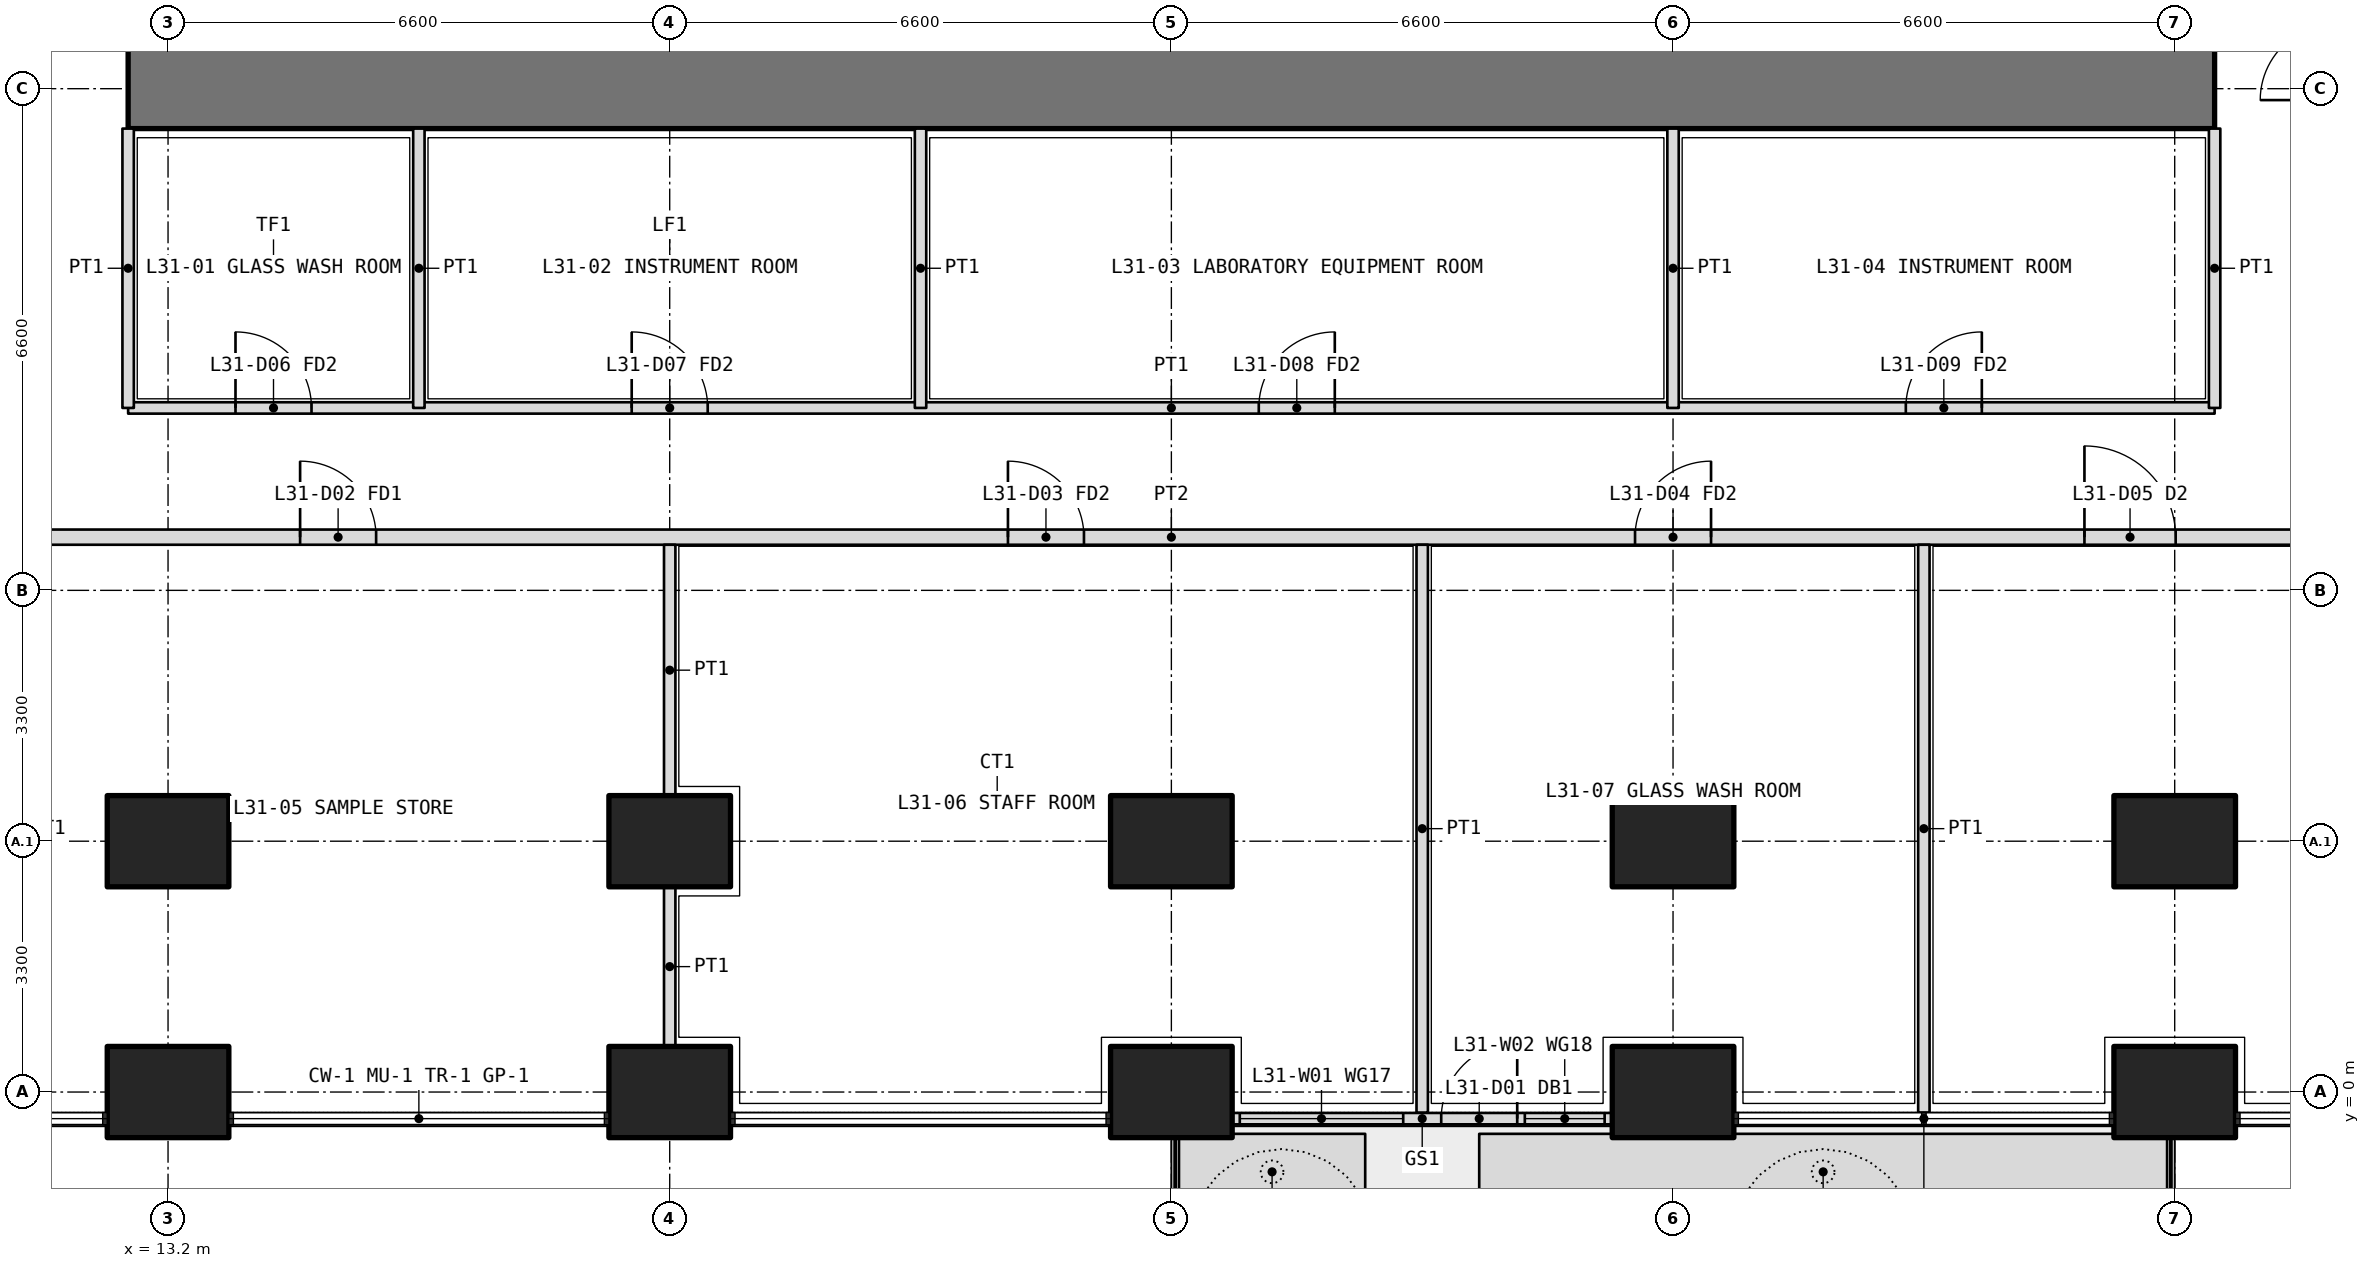
"""IFC4 building model, lengths in metres.
Left out: names, types, materials, properties, quantities, classifications, styles, units other than length and angle.
Written with IfcOpenShell. Run it as: python <this file> out.ifc"""

import sys

from ifc_helpers import new_model, si_unit, direction, frame, frame_2d, origin, origin_2d, place, context, subcontext, project, spatial, polyline, rectangle, outline, extrude, element, fill, save


model = new_model("IFC4")
c1 = context("Model", 3, precision=1e-05, world=origin(), true_north=direction((0.0, 1.0)))
c2 = subcontext(c1, "Body", "Model", "MODEL_VIEW")
j1 = project(units=[si_unit("LENGTHUNIT", "METRE"), si_unit("PLANEANGLEUNIT", "RADIAN")], contexts=[c1])
p1 = place(None, origin())
s1 = spatial("IfcSite", under=j1, at=p1, CompositionType="ELEMENT")
p2 = place(p1, origin())
s2 = spatial("IfcBuilding", under=s1, at=p2, CompositionType="ELEMENT")
p3 = place(p2, frame((0.0, 0.0, 136.8)))
s3 = spatial("IfcBuildingStorey", under=s2, at=p3, CompositionType="ELEMENT", Elevation=136.8)
for number, where, z_axis, x_axis in (
    (1, (13.2, 0.0, 0.0), (0.0, 0.0, 1.0), (1.0, 0.0, 0.0)),
    (2, (19.8, 0.0, 0.0), (0.0, 0.0, 1.0), (1.0, 0.0, 0.0)),
    (3, (26.4, 0.0, 0.0), (0.0, 0.0, 1.0), (1.0, 0.0, 0.0)),
    (4, (33.0, 0.0, 0.0), (0.0, 0.0, 1.0), (1.0, 0.0, 0.0)),
    (5, (39.6, 0.0, 0.0), (0.0, 0.0, 1.0), (1.0, 0.0, 0.0)),
    (6, (13.2, 3.3, 0.0), (0.0, 0.0, 1.0), (1.0, 0.0, 0.0)),
    (7, (19.8, 3.3, 0.0), (0.0, 0.0, 1.0), (1.0, 0.0, 0.0)),
    (8, (26.4, 3.3, 0.0), (0.0, 0.0, 1.0), (1.0, 0.0, 0.0)),
    (9, (33.0, 3.3, 0.0), (0.0, 0.0, 1.0), (1.0, 0.0, 0.0)),
    (10, (39.6, 3.3, 0.0), (0.0, 0.0, 1.0), (1.0, 0.0, 0.0)),
):
    element("IfcColumn", number, at=place(p3, frame(where, z_axis=z_axis, x_axis=x_axis)), inside=s3, PredefinedType="COLUMN", context=c2, shape_type="SweptSolid", body=[
        extrude(rectangle(XDim=1.6, YDim=1.2, at=origin_2d()), origin(), (0.0, 0.0, 1.0), 4.2),
    ])
p4 = place(p3, origin())
e11 = element("IfcWall", 11, at=p4, inside=s3, PredefinedType="USERDEFINED", context=c2, shape_type="SweptSolid", body=[
    extrude(outline(polyline([(26.5, -1.55), (28.95, -1.55), (28.95, -0.55), (26.5, -0.55), (26.5, -1.55)]), holes=[polyline([(26.65, -1.4), (28.8, -1.4), (28.8, -0.7), (26.65, -0.7), (26.65, -1.4)])]), origin(), (0.0, 0.0, 1.0), 1.05),
])
p5 = place(p3, origin())
e12 = element("IfcWall", 12, at=p5, inside=s3, PredefinedType="USERDEFINED", context=c2, shape_type="SweptSolid", body=[
    extrude(outline(polyline([(30.45, -1.55), (39.5, -1.55), (39.5, -0.55), (30.45, -0.55), (30.45, -1.55)]), holes=[polyline([(30.6, -1.4), (39.35, -1.4), (39.35, -0.7), (30.6, -0.7), (30.6, -1.4)])]), origin(), (0.0, 0.0, 1.0), 1.05),
])
p6 = place(p3, frame((27.2, -0.35, 0.0), z_axis=(0.0, 0.0, 1.0), x_axis=(1.0, 0.0, 0.0)))
e13 = element("IfcWall", 13, at=p6, inside=s3, PredefinedType="SOLIDWALL", context=c2, shape_type="SweptSolid", body=[
    extrude(rectangle(XDim=5.0, YDim=0.15, at=frame_2d((2.5, 0.0))), origin(), (0.0, 0.0, 1.0), 2.6),
])
p7 = place(p6, frame((2.75, 0.0, 0.0)))
e14 = element("IfcOpeningElement", 14, at=p7, cuts=e13, PredefinedType="OPENING", context=c2, shape_type="SweptSolid", body=[
    extrude(rectangle(XDim=1.0, YDim=2.4, at=frame_2d((0.5, 1.2))), frame((0.0, 0.085, 0.0), z_axis=(0.0, -1.0, 0.0), x_axis=(1.0, 0.0, 0.0)), (0.0, 0.0, 1.0), 0.17),
])
p8 = place(p6, frame((0.1, 0.0, 0.1)))
e15 = element("IfcOpeningElement", 15, at=p8, cuts=e13, PredefinedType="OPENING", context=c2, shape_type="SweptSolid", body=[
    extrude(rectangle(XDim=2.15, YDim=2.2, at=frame_2d((1.075, 1.1))), frame((0.0, 0.085, 0.0), z_axis=(0.0, -1.0, 0.0), x_axis=(1.0, 0.0, 0.0)), (0.0, 0.0, 1.0), 0.17),
])
p9 = place(p6, frame((3.85, 0.0, 0.1)))
e16 = element("IfcOpeningElement", 16, at=p9, cuts=e13, PredefinedType="OPENING", context=c2, shape_type="SweptSolid", body=[
    extrude(rectangle(XDim=1.05, YDim=2.2, at=frame_2d((0.525, 1.1))), frame((0.0, 0.085, 0.0), z_axis=(0.0, -1.0, 0.0), x_axis=(1.0, 0.0, 0.0)), (0.0, 0.0, 1.0), 0.17),
])
p10 = place(p3, frame((12.675, 13.2, 0.0), z_axis=(0.0, 0.0, 1.0), x_axis=(1.0, 0.0, 0.0)))
e17 = element("IfcWall", 17, at=p10, inside=s3, PredefinedType="SHEAR", context=c2, shape_type="SweptSolid", body=[
    extrude(rectangle(XDim=27.45, YDim=1.05, at=frame_2d((13.725, 0.0))), origin(), (0.0, 0.0, 1.0), 4.2),
])
p11 = place(p3, frame((12.675, 9.0, 0.0), z_axis=(0.0, 0.0, 1.0), x_axis=(1.0, 0.0, 0.0)))
e18 = element("IfcWall", 18, at=p11, inside=s3, PredefinedType="PARTITIONING", context=c2, shape_type="SweptSolid", body=[
    extrude(rectangle(XDim=27.45, YDim=0.15, at=frame_2d((13.725, 0.0))), origin(), (0.0, 0.0, 1.0), 2.85),
])
p12 = place(p11, frame((1.413, 0.0, 0.0)))
e19 = element("IfcOpeningElement", 19, at=p12, cuts=e18, PredefinedType="OPENING", context=c2, shape_type="SweptSolid", body=[
    extrude(rectangle(XDim=1.0, YDim=2.1, at=frame_2d((0.5, 1.05))), frame((0.0, 0.085, 0.0), z_axis=(0.0, -1.0, 0.0), x_axis=(1.0, 0.0, 0.0)), (0.0, 0.0, 1.0), 0.17),
])
p13 = place(p11, frame((6.625, 0.0, 0.0)))
e20 = element("IfcOpeningElement", 20, at=p13, cuts=e18, PredefinedType="OPENING", context=c2, shape_type="SweptSolid", body=[
    extrude(rectangle(XDim=1.0, YDim=2.1, at=frame_2d((0.5, 1.05))), frame((0.0, 0.085, 0.0), z_axis=(0.0, -1.0, 0.0), x_axis=(1.0, 0.0, 0.0)), (0.0, 0.0, 1.0), 0.17),
])
p14 = place(p11, frame((14.875, 0.0, 0.0)))
e21 = element("IfcOpeningElement", 21, at=p14, cuts=e18, PredefinedType="OPENING", context=c2, shape_type="SweptSolid", body=[
    extrude(rectangle(XDim=1.0, YDim=2.1, at=frame_2d((0.5, 1.05))), frame((0.0, 0.085, 0.0), z_axis=(0.0, -1.0, 0.0), x_axis=(1.0, 0.0, 0.0)), (0.0, 0.0, 1.0), 0.17),
])
p15 = place(p11, frame((23.387, 0.0, 0.0)))
e22 = element("IfcOpeningElement", 22, at=p15, cuts=e18, PredefinedType="OPENING", context=c2, shape_type="SweptSolid", body=[
    extrude(rectangle(XDim=1.0, YDim=2.1, at=frame_2d((0.5, 1.05))), frame((0.0, 0.085, 0.0), z_axis=(0.0, -1.0, 0.0), x_axis=(1.0, 0.0, 0.0)), (0.0, 0.0, 1.0), 0.17),
])
for number, where, z_axis, x_axis in (
    (23, (12.675, 12.675, 0.0), (0.0, 0.0, 1.0), (0.0, -1.0, 0.0)),
    (24, (40.125, 12.675, 0.0), (0.0, 0.0, 1.0), (0.0, -1.0, 0.0)),
):
    element("IfcWall", number, at=place(p3, frame(where, z_axis=z_axis, x_axis=x_axis)), inside=s3, PredefinedType="PARTITIONING", context=c2, shape_type="SweptSolid", body=[
        extrude(rectangle(XDim=3.675, YDim=0.15, at=frame_2d((1.837, 0.0))), origin(), (0.0, 0.0, 1.0), 2.85),
    ])
for number, where, z_axis, x_axis in (
    (25, (16.5, 12.675, 0.0), (0.0, 0.0, 1.0), (0.0, -1.0, 0.0)),
    (26, (23.1, 12.675, 0.0), (0.0, 0.0, 1.0), (0.0, -1.0, 0.0)),
):
    element("IfcWall", number, at=place(p3, frame(where, z_axis=z_axis, x_axis=x_axis)), inside=s3, PredefinedType="PARTITIONING", context=c2, shape_type="SweptSolid", body=[
        extrude(rectangle(XDim=3.675, YDim=0.15, at=frame_2d((1.837, 0.0))), origin(), (0.0, 0.0, 1.0), 3.9),
    ])
p16 = place(p3, frame((33.0, 12.675, 0.0), z_axis=(0.0, 0.0, 1.0), x_axis=(0.0, -1.0, 0.0)))
e27 = element("IfcWall", 27, at=p16, inside=s3, PredefinedType="PARTITIONING", context=c2, shape_type="SweptSolid", body=[
    extrude(rectangle(XDim=3.675, YDim=0.15, at=frame_2d((1.837, 0.0))), origin(), (0.0, 0.0, 1.0), 2.85),
])
p17 = place(p3, frame((10.975, 7.3, 0.0), z_axis=(0.0, 0.0, 1.0), x_axis=(1.0, 0.0, 0.0)))
e28 = element("IfcWall", 28, at=p17, inside=s3, PredefinedType="PARTITIONING", context=c2, shape_type="SweptSolid", body=[
    extrude(rectangle(XDim=30.85, YDim=0.2, at=frame_2d((15.425, 0.0))), origin(), (0.0, 0.0, 1.0), 2.85),
])
p18 = place(p17, frame((3.962, 0.0, 0.0)))
e29 = element("IfcOpeningElement", 29, at=p18, cuts=e28, PredefinedType="OPENING", context=c2, shape_type="SweptSolid", body=[
    extrude(rectangle(XDim=1.0, YDim=2.1, at=frame_2d((0.5, 1.05))), frame((0.0, 0.11, 0.0), z_axis=(0.0, -1.0, 0.0), x_axis=(1.0, 0.0, 0.0)), (0.0, 0.0, 1.0), 0.22),
])
p19 = place(p17, frame((13.275, 0.0, 0.0)))
e30 = element("IfcOpeningElement", 30, at=p19, cuts=e28, PredefinedType="OPENING", context=c2, shape_type="SweptSolid", body=[
    extrude(rectangle(XDim=1.0, YDim=2.1, at=frame_2d((0.5, 1.05))), frame((0.0, 0.11, 0.0), z_axis=(0.0, -1.0, 0.0), x_axis=(1.0, 0.0, 0.0)), (0.0, 0.0, 1.0), 0.22),
])
p20 = place(p17, frame((21.525, 0.0, 0.0)))
e31 = element("IfcOpeningElement", 31, at=p20, cuts=e28, PredefinedType="OPENING", context=c2, shape_type="SweptSolid", body=[
    extrude(rectangle(XDim=1.0, YDim=2.1, at=frame_2d((0.5, 1.05))), frame((0.0, 0.11, 0.0), z_axis=(0.0, -1.0, 0.0), x_axis=(1.0, 0.0, 0.0)), (0.0, 0.0, 1.0), 0.22),
])
p21 = place(p17, frame((27.438, 0.0, 0.0)))
e32 = element("IfcOpeningElement", 32, at=p21, cuts=e28, PredefinedType="OPENING", context=c2, shape_type="SweptSolid", body=[
    extrude(rectangle(XDim=1.2, YDim=2.1, at=frame_2d((0.6, 1.05))), frame((0.0, 0.11, 0.0), z_axis=(0.0, -1.0, 0.0), x_axis=(1.0, 0.0, 0.0)), (0.0, 0.0, 1.0), 0.22),
])
p22 = place(p3, frame((19.8, 0.6, 0.0), z_axis=(0.0, 0.0, 1.0), x_axis=(0.0, 1.0, 0.0)))
e33 = element("IfcWall", 33, at=p22, inside=s3, PredefinedType="PARTITIONING", context=c2, shape_type="SweptSolid", body=[
    extrude(rectangle(XDim=2.1, YDim=0.15, at=frame_2d((1.05, 0.0))), origin(), (0.0, 0.0, 1.0), 2.85),
])
p23 = place(p3, frame((19.8, 3.9, 0.0), z_axis=(0.0, 0.0, 1.0), x_axis=(0.0, 1.0, 0.0)))
e34 = element("IfcWall", 34, at=p23, inside=s3, PredefinedType="PARTITIONING", context=c2, shape_type="SweptSolid", body=[
    extrude(rectangle(XDim=3.3, YDim=0.15, at=frame_2d((1.65, 0.0))), origin(), (0.0, 0.0, 1.0), 2.85),
])
for number, where, z_axis, x_axis in (
    (35, (29.7, -0.27, 0.0), (0.0, 0.0, 1.0), (0.0, 1.0, 0.0)),
    (36, (36.3, -0.27, 0.0), (0.0, 0.0, 1.0), (0.0, 1.0, 0.0)),
):
    element("IfcWall", number, at=place(p3, frame(where, z_axis=z_axis, x_axis=x_axis)), inside=s3, PredefinedType="PARTITIONING", context=c2, shape_type="SweptSolid", body=[
        extrude(rectangle(XDim=7.47, YDim=0.15, at=frame_2d((3.735, 0.0))), origin(), (0.0, 0.0, 1.0), 2.6),
    ])
p24 = place(p7, origin())
e37 = element("IfcDoor", 37, at=p24, inside=s3, OperationType="SINGLE_SWING_RIGHT", PredefinedType="DOOR", context=c2, shape_type="SweptSolid", body=[
    extrude(rectangle(XDim=1.0, YDim=2.4, at=frame_2d((0.5, 1.2))), frame((0.0, 0.025, 0.0), z_axis=(0.0, -1.0, 0.0), x_axis=(1.0, 0.0, 0.0)), (0.0, 0.0, 1.0), 0.05),
])
fill(e14, e37)
p25 = place(p8, origin())
e38 = element("IfcWindow", 38, at=p25, inside=s3, PartitioningType="SINGLE_PANEL", PredefinedType="WINDOW", context=c2, shape_type="SweptSolid", body=[
    extrude(rectangle(XDim=2.15, YDim=2.2, at=frame_2d((1.075, 1.1))), frame((0.0, 0.03, 0.0), z_axis=(0.0, -1.0, 0.0), x_axis=(1.0, 0.0, 0.0)), (0.0, 0.0, 1.0), 0.06),
])
fill(e15, e38)
p26 = place(p9, origin())
e39 = element("IfcWindow", 39, at=p26, inside=s3, PartitioningType="SINGLE_PANEL", PredefinedType="WINDOW", context=c2, shape_type="SweptSolid", body=[
    extrude(rectangle(XDim=1.05, YDim=2.2, at=frame_2d((0.525, 1.1))), frame((0.0, 0.03, 0.0), z_axis=(0.0, -1.0, 0.0), x_axis=(1.0, 0.0, 0.0)), (0.0, 0.0, 1.0), 0.06),
])
fill(e16, e39)
p27 = place(p12, origin())
e40 = element("IfcDoor", 40, at=p27, inside=s3, OperationType="SINGLE_SWING_LEFT", PredefinedType="DOOR", context=c2, shape_type="SweptSolid", body=[
    extrude(rectangle(XDim=1.0, YDim=2.1, at=frame_2d((0.5, 1.05))), frame((0.0, 0.025, 0.0), z_axis=(0.0, -1.0, 0.0), x_axis=(1.0, 0.0, 0.0)), (0.0, 0.0, 1.0), 0.05),
])
fill(e19, e40)
p28 = place(p13, origin())
e41 = element("IfcDoor", 41, at=p28, inside=s3, OperationType="SINGLE_SWING_LEFT", PredefinedType="DOOR", context=c2, shape_type="SweptSolid", body=[
    extrude(rectangle(XDim=1.0, YDim=2.1, at=frame_2d((0.5, 1.05))), frame((0.0, 0.025, 0.0), z_axis=(0.0, -1.0, 0.0), x_axis=(1.0, 0.0, 0.0)), (0.0, 0.0, 1.0), 0.05),
])
fill(e20, e41)
p29 = place(p14, origin())
e42 = element("IfcDoor", 42, at=p29, inside=s3, OperationType="SINGLE_SWING_RIGHT", PredefinedType="DOOR", context=c2, shape_type="SweptSolid", body=[
    extrude(rectangle(XDim=1.0, YDim=2.1, at=frame_2d((0.5, 1.05))), frame((0.0, 0.025, 0.0), z_axis=(0.0, -1.0, 0.0), x_axis=(1.0, 0.0, 0.0)), (0.0, 0.0, 1.0), 0.05),
])
fill(e21, e42)
p30 = place(p15, origin())
e43 = element("IfcDoor", 43, at=p30, inside=s3, OperationType="SINGLE_SWING_RIGHT", PredefinedType="DOOR", context=c2, shape_type="SweptSolid", body=[
    extrude(rectangle(XDim=1.0, YDim=2.1, at=frame_2d((0.5, 1.05))), frame((0.0, 0.025, 0.0), z_axis=(0.0, -1.0, 0.0), x_axis=(1.0, 0.0, 0.0)), (0.0, 0.0, 1.0), 0.05),
])
fill(e22, e43)
p31 = place(p18, origin())
e44 = element("IfcDoor", 44, at=p31, inside=s3, OperationType="SINGLE_SWING_LEFT", PredefinedType="DOOR", context=c2, shape_type="SweptSolid", body=[
    extrude(rectangle(XDim=1.0, YDim=2.1, at=frame_2d((0.5, 1.05))), frame((0.0, 0.025, 0.0), z_axis=(0.0, -1.0, 0.0), x_axis=(1.0, 0.0, 0.0)), (0.0, 0.0, 1.0), 0.05),
])
fill(e29, e44)
p32 = place(p19, origin())
e45 = element("IfcDoor", 45, at=p32, inside=s3, OperationType="SINGLE_SWING_LEFT", PredefinedType="DOOR", context=c2, shape_type="SweptSolid", body=[
    extrude(rectangle(XDim=1.0, YDim=2.1, at=frame_2d((0.5, 1.05))), frame((0.0, 0.025, 0.0), z_axis=(0.0, -1.0, 0.0), x_axis=(1.0, 0.0, 0.0)), (0.0, 0.0, 1.0), 0.05),
])
fill(e30, e45)
p33 = place(p20, origin())
e46 = element("IfcDoor", 46, at=p33, inside=s3, OperationType="SINGLE_SWING_RIGHT", PredefinedType="DOOR", context=c2, shape_type="SweptSolid", body=[
    extrude(rectangle(XDim=1.0, YDim=2.1, at=frame_2d((0.5, 1.05))), frame((0.0, 0.025, 0.0), z_axis=(0.0, -1.0, 0.0), x_axis=(1.0, 0.0, 0.0)), (0.0, 0.0, 1.0), 0.05),
])
fill(e31, e46)
p34 = place(p21, origin())
e47 = element("IfcDoor", 47, at=p34, inside=s3, OperationType="DOUBLE_DOOR_SINGLE_SWING", PredefinedType="DOOR", context=c2, shape_type="SweptSolid", body=[
    extrude(rectangle(XDim=1.2, YDim=2.1, at=frame_2d((0.6, 1.05))), frame((0.0, 0.025, 0.0), z_axis=(0.0, -1.0, 0.0), x_axis=(1.0, 0.0, 0.0)), (0.0, 0.0, 1.0), 0.05),
])
fill(e32, e47)
save(model, sys.argv[1])
